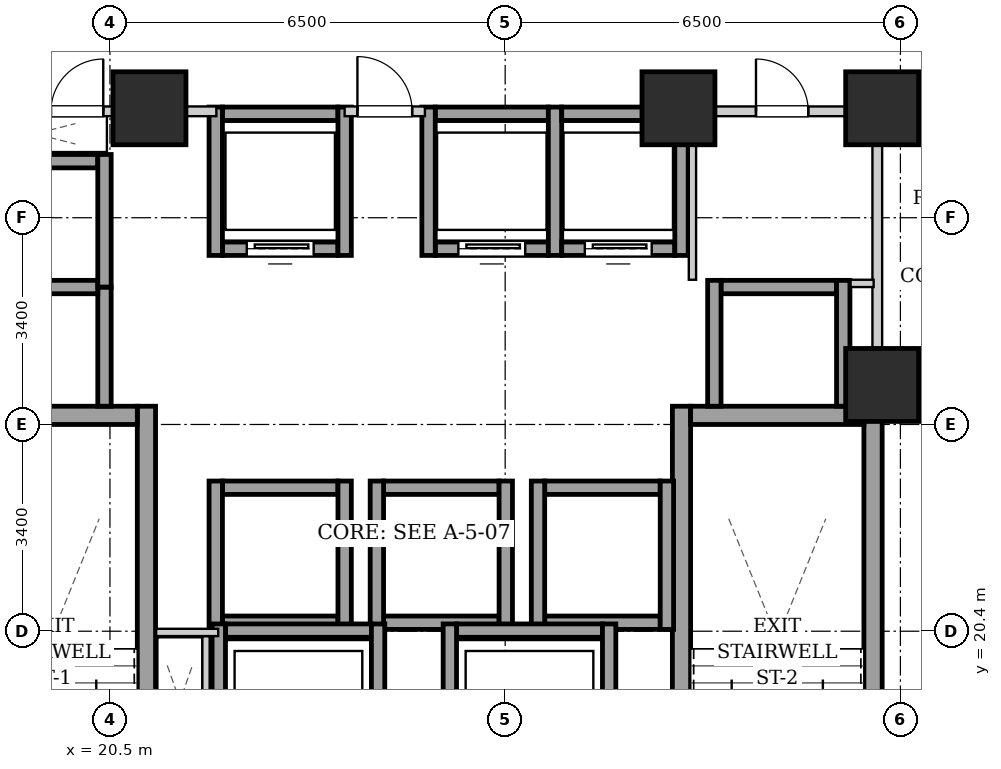
"""IFC4 building model, lengths in metres.
Left out: names, types, materials, properties, quantities, classifications, styles, units other than length and angle.
Written with IfcOpenShell. Run it as: python <this file> out.ifc"""

import sys

from ifc_helpers import new_model, si_unit, direction, frame, frame_2d, origin, origin_2d, place, context, subcontext, project, spatial, rectangle, extrude, element, fill, save


model = new_model("IFC4")
c1 = context("Model", 3, precision=1e-05, world=origin(), true_north=direction((0.0, 1.0)))
c2 = subcontext(c1, "Body", "Model", "MODEL_VIEW")
j1 = project(units=[si_unit("LENGTHUNIT", "METRE"), si_unit("PLANEANGLEUNIT", "RADIAN")], contexts=[c1])
p1 = place(None, origin())
s1 = spatial("IfcSite", under=j1, at=p1, CompositionType="ELEMENT")
p2 = place(p1, origin())
s2 = spatial("IfcBuilding", under=s1, at=p2, CompositionType="ELEMENT")
p3 = place(p2, frame((0.0, 0.0, 70.6)))
s3 = spatial("IfcBuildingStorey", under=s2, at=p3, CompositionType="ELEMENT", Elevation=70.6)
for number, where, z_axis, x_axis in (
    (1, (21.15, 29.0, 0.0), (0.0, 0.0, 1.0), (1.0, 0.0, 0.0)),
    (2, (29.85, 29.0, 0.0), (0.0, 0.0, 1.0), (1.0, 0.0, 0.0)),
    (3, (33.2, 29.0, 0.0), (0.0, 0.0, 1.0), (1.0, 0.0, 0.0)),
    (4, (33.2, 24.45, 0.0), (0.0, 0.0, 1.0), (1.0, 0.0, 0.0)),
):
    element("IfcColumn", number, at=place(p3, frame(where, z_axis=z_axis, x_axis=x_axis)), inside=s3, PredefinedType="COLUMN", context=c2, shape_type="SweptSolid", body=[
        extrude(rectangle(XDim=1.2, YDim=1.2, at=origin_2d()), origin(), (0.0, 0.0, 1.0), 4.5),
    ])
p4 = place(p3, frame((21.1, 15.1, 0.0), z_axis=(0.0, 0.0, 1.0), x_axis=(0.0, 1.0, 0.0)))
e5 = element("IfcWall", 5, at=p4, inside=s3, PredefinedType="SHEAR", context=c2, shape_type="SweptSolid", body=[
    extrude(rectangle(XDim=9.0, YDim=0.3, at=frame_2d((4.5, 0.0))), origin(), (0.0, 0.0, 1.0), 4.24),
])
p5 = place(p3, frame((18.1, 23.95, 0.0), z_axis=(0.0, 0.0, 1.0), x_axis=(1.0, 0.0, 0.0)))
e6 = element("IfcWall", 6, at=p5, inside=s3, PredefinedType="SHEAR", context=c2, shape_type="SweptSolid", body=[
    extrude(rectangle(XDim=2.85, YDim=0.3, at=frame_2d((1.425, 0.0))), origin(), (0.0, 0.0, 1.0), 4.24),
])
for number, where, z_axis, x_axis in (
    (7, (29.9, 15.1, 0.0), (0.0, 0.0, 1.0), (0.0, 1.0, 0.0)),
    (8, (33.05, 15.1, 0.0), (0.0, 0.0, 1.0), (0.0, 1.0, 0.0)),
):
    element("IfcWall", number, at=place(p3, frame(where, z_axis=z_axis, x_axis=x_axis)), inside=s3, PredefinedType="SHEAR", context=c2, shape_type="SweptSolid", body=[
        extrude(rectangle(XDim=9.0, YDim=0.3, at=frame_2d((4.5, 0.0))), origin(), (0.0, 0.0, 1.0), 4.24),
    ])
p6 = place(p3, frame((30.05, 23.95, 0.0), z_axis=(0.0, 0.0, 1.0), x_axis=(1.0, 0.0, 0.0)))
e9 = element("IfcWall", 9, at=p6, inside=s3, PredefinedType="SHEAR", context=c2, shape_type="SweptSolid", body=[
    extrude(rectangle(XDim=2.85, YDim=0.3, at=frame_2d((1.425, 0.0))), origin(), (0.0, 0.0, 1.0), 4.24),
])
p7 = place(p3, frame((22.35, 26.69, 0.0), z_axis=(0.0, 0.0, 1.0), x_axis=(1.0, 0.0, 0.0)))
e10 = element("IfcWall", 10, at=p7, inside=s3, PredefinedType="SHEAR", context=c2, shape_type="SweptSolid", body=[
    extrude(rectangle(XDim=1.9, YDim=0.22, at=frame_2d((0.95, 0.0))), origin(), (0.0, 0.0, 1.0), 4.24),
])
p8 = place(p7, frame((0.4, 0.0, 0.0)))
e11 = element("IfcOpeningElement", 11, at=p8, cuts=e10, PredefinedType="OPENING", context=c2, shape_type="SweptSolid", body=[
    extrude(rectangle(XDim=1.1, YDim=2.15, at=frame_2d((0.55, 1.075))), frame((0.0, 0.12, 0.0), z_axis=(0.0, -1.0, 0.0), x_axis=(1.0, 0.0, 0.0)), (0.0, 0.0, 1.0), 0.24),
])
p9 = place(p3, frame((22.35, 28.91, 0.0), z_axis=(0.0, 0.0, 1.0), x_axis=(1.0, 0.0, 0.0)))
e12 = element("IfcWall", 12, at=p9, inside=s3, PredefinedType="SHEAR", context=c2, shape_type="SweptSolid", body=[
    extrude(rectangle(XDim=1.9, YDim=0.22, at=frame_2d((0.95, 0.0))), origin(), (0.0, 0.0, 1.0), 4.24),
])
for number, where, z_axis, x_axis in (
    (13, (22.24, 26.58, 0.0), (0.0, 0.0, 1.0), (0.0, 1.0, 0.0)),
    (14, (24.36, 26.58, 0.0), (0.0, 0.0, 1.0), (0.0, 1.0, 0.0)),
):
    element("IfcWall", number, at=place(p3, frame(where, z_axis=z_axis, x_axis=x_axis)), inside=s3, PredefinedType="SHEAR", context=c2, shape_type="SweptSolid", body=[
        extrude(rectangle(XDim=2.44, YDim=0.22, at=frame_2d((1.22, 0.0))), origin(), (0.0, 0.0, 1.0), 4.24),
    ])
p10 = place(p3, frame((25.85, 26.69, 0.0), z_axis=(0.0, 0.0, 1.0), x_axis=(1.0, 0.0, 0.0)))
e15 = element("IfcWall", 15, at=p10, inside=s3, PredefinedType="SHEAR", context=c2, shape_type="SweptSolid", body=[
    extrude(rectangle(XDim=1.86, YDim=0.22, at=frame_2d((0.93, 0.0))), origin(), (0.0, 0.0, 1.0), 4.24),
])
p11 = place(p10, frame((0.38, 0.0, 0.0)))
e16 = element("IfcOpeningElement", 16, at=p11, cuts=e15, PredefinedType="OPENING", context=c2, shape_type="SweptSolid", body=[
    extrude(rectangle(XDim=1.1, YDim=2.15, at=frame_2d((0.55, 1.075))), frame((0.0, 0.12, 0.0), z_axis=(0.0, -1.0, 0.0), x_axis=(1.0, 0.0, 0.0)), (0.0, 0.0, 1.0), 0.24),
])
p12 = place(p3, frame((25.85, 28.91, 0.0), z_axis=(0.0, 0.0, 1.0), x_axis=(1.0, 0.0, 0.0)))
e17 = element("IfcWall", 17, at=p12, inside=s3, PredefinedType="SHEAR", context=c2, shape_type="SweptSolid", body=[
    extrude(rectangle(XDim=1.86, YDim=0.22, at=frame_2d((0.93, 0.0))), origin(), (0.0, 0.0, 1.0), 4.24),
])
for number, where, z_axis, x_axis in (
    (18, (25.74, 26.58, 0.0), (0.0, 0.0, 1.0), (0.0, 1.0, 0.0)),
    (19, (27.82, 26.58, 0.0), (0.0, 0.0, 1.0), (0.0, 1.0, 0.0)),
):
    element("IfcWall", number, at=place(p3, frame(where, z_axis=z_axis, x_axis=x_axis)), inside=s3, PredefinedType="SHEAR", context=c2, shape_type="SweptSolid", body=[
        extrude(rectangle(XDim=2.44, YDim=0.22, at=frame_2d((1.22, 0.0))), origin(), (0.0, 0.0, 1.0), 4.24),
    ])
p13 = place(p3, frame((27.93, 26.69, 0.0), z_axis=(0.0, 0.0, 1.0), x_axis=(1.0, 0.0, 0.0)))
e20 = element("IfcWall", 20, at=p13, inside=s3, PredefinedType="SHEAR", context=c2, shape_type="SweptSolid", body=[
    extrude(rectangle(XDim=1.86, YDim=0.22, at=frame_2d((0.93, 0.0))), origin(), (0.0, 0.0, 1.0), 4.24),
])
p14 = place(p13, frame((0.38, 0.0, 0.0)))
e21 = element("IfcOpeningElement", 21, at=p14, cuts=e20, PredefinedType="OPENING", context=c2, shape_type="SweptSolid", body=[
    extrude(rectangle(XDim=1.1, YDim=2.15, at=frame_2d((0.55, 1.075))), frame((0.0, 0.12, 0.0), z_axis=(0.0, -1.0, 0.0), x_axis=(1.0, 0.0, 0.0)), (0.0, 0.0, 1.0), 0.24),
])
p15 = place(p3, frame((27.93, 28.91, 0.0), z_axis=(0.0, 0.0, 1.0), x_axis=(1.0, 0.0, 0.0)))
e22 = element("IfcWall", 22, at=p15, inside=s3, PredefinedType="SHEAR", context=c2, shape_type="SweptSolid", body=[
    extrude(rectangle(XDim=1.86, YDim=0.22, at=frame_2d((0.93, 0.0))), origin(), (0.0, 0.0, 1.0), 4.24),
])
p16 = place(p3, frame((29.9, 26.58, 0.0), z_axis=(0.0, 0.0, 1.0), x_axis=(0.0, 1.0, 0.0)))
e23 = element("IfcWall", 23, at=p16, inside=s3, PredefinedType="SHEAR", context=c2, shape_type="SweptSolid", body=[
    extrude(rectangle(XDim=2.44, YDim=0.22, at=frame_2d((1.22, 0.0))), origin(), (0.0, 0.0, 1.0), 4.24),
])
for number, where, z_axis, x_axis in (
    (24, (22.35, 20.54, 0.0), (0.0, 0.0, 1.0), (1.0, 0.0, 0.0)),
    (25, (22.35, 22.76, 0.0), (0.0, 0.0, 1.0), (1.0, 0.0, 0.0)),
):
    element("IfcWall", number, at=place(p3, frame(where, z_axis=z_axis, x_axis=x_axis)), inside=s3, PredefinedType="SHEAR", context=c2, shape_type="SweptSolid", body=[
        extrude(rectangle(XDim=1.9, YDim=0.22, at=frame_2d((0.95, 0.0))), origin(), (0.0, 0.0, 1.0), 4.24),
    ])
for number, where, z_axis, x_axis in (
    (26, (22.24, 20.43, 0.0), (0.0, 0.0, 1.0), (0.0, 1.0, 0.0)),
    (27, (24.36, 20.43, 0.0), (0.0, 0.0, 1.0), (0.0, 1.0, 0.0)),
):
    element("IfcWall", number, at=place(p3, frame(where, z_axis=z_axis, x_axis=x_axis)), inside=s3, PredefinedType="SHEAR", context=c2, shape_type="SweptSolid", body=[
        extrude(rectangle(XDim=2.44, YDim=0.22, at=frame_2d((1.22, 0.0))), origin(), (0.0, 0.0, 1.0), 4.24),
    ])
for number, where, z_axis, x_axis in (
    (28, (25.0, 20.54, 0.0), (0.0, 0.0, 1.0), (1.0, 0.0, 0.0)),
    (29, (25.0, 22.76, 0.0), (0.0, 0.0, 1.0), (1.0, 0.0, 0.0)),
):
    element("IfcWall", number, at=place(p3, frame(where, z_axis=z_axis, x_axis=x_axis)), inside=s3, PredefinedType="SHEAR", context=c2, shape_type="SweptSolid", body=[
        extrude(rectangle(XDim=1.9, YDim=0.22, at=frame_2d((0.95, 0.0))), origin(), (0.0, 0.0, 1.0), 4.24),
    ])
for number, where, z_axis, x_axis in (
    (30, (24.89, 20.43, 0.0), (0.0, 0.0, 1.0), (0.0, 1.0, 0.0)),
    (31, (27.01, 20.43, 0.0), (0.0, 0.0, 1.0), (0.0, 1.0, 0.0)),
):
    element("IfcWall", number, at=place(p3, frame(where, z_axis=z_axis, x_axis=x_axis)), inside=s3, PredefinedType="SHEAR", context=c2, shape_type="SweptSolid", body=[
        extrude(rectangle(XDim=2.44, YDim=0.22, at=frame_2d((1.22, 0.0))), origin(), (0.0, 0.0, 1.0), 4.24),
    ])
for number, where, z_axis, x_axis in (
    (32, (27.65, 20.54, 0.0), (0.0, 0.0, 1.0), (1.0, 0.0, 0.0)),
    (33, (27.65, 22.76, 0.0), (0.0, 0.0, 1.0), (1.0, 0.0, 0.0)),
):
    element("IfcWall", number, at=place(p3, frame(where, z_axis=z_axis, x_axis=x_axis)), inside=s3, PredefinedType="SHEAR", context=c2, shape_type="SweptSolid", body=[
        extrude(rectangle(XDim=1.9, YDim=0.22, at=frame_2d((0.95, 0.0))), origin(), (0.0, 0.0, 1.0), 4.24),
    ])
for number, where, z_axis, x_axis in (
    (34, (27.54, 20.43, 0.0), (0.0, 0.0, 1.0), (0.0, 1.0, 0.0)),
    (35, (29.66, 20.43, 0.0), (0.0, 0.0, 1.0), (0.0, 1.0, 0.0)),
):
    element("IfcWall", number, at=place(p3, frame(where, z_axis=z_axis, x_axis=x_axis)), inside=s3, PredefinedType="SHEAR", context=c2, shape_type="SweptSolid", body=[
        extrude(rectangle(XDim=2.44, YDim=0.22, at=frame_2d((1.22, 0.0))), origin(), (0.0, 0.0, 1.0), 4.24),
    ])
p17 = place(p3, frame((20.41, 24.1, 0.0), z_axis=(0.0, 0.0, 1.0), x_axis=(0.0, 1.0, 0.0)))
e36 = element("IfcWall", 36, at=p17, inside=s3, PredefinedType="SHEAR", context=c2, shape_type="SweptSolid", body=[
    extrude(rectangle(XDim=1.96, YDim=0.22, at=frame_2d((0.98, 0.0))), origin(), (0.0, 0.0, 1.0), 4.24),
])
for number, where, z_axis, x_axis in (
    (37, (18.4, 26.06, 0.0), (0.0, 0.0, 1.0), (1.0, 0.0, 0.0)),
    (38, (18.4, 28.13, 0.0), (0.0, 0.0, 1.0), (1.0, 0.0, 0.0)),
):
    element("IfcWall", number, at=place(p3, frame(where, z_axis=z_axis, x_axis=x_axis)), inside=s3, PredefinedType="SHEAR", context=c2, shape_type="SweptSolid", body=[
        extrude(rectangle(XDim=1.9, YDim=0.22, at=frame_2d((0.95, 0.0))), origin(), (0.0, 0.0, 1.0), 4.24),
    ])
p18 = place(p3, frame((20.41, 26.06, 0.0), z_axis=(0.0, 0.0, 1.0), x_axis=(0.0, 1.0, 0.0)))
e39 = element("IfcWall", 39, at=p18, inside=s3, PredefinedType="SHEAR", context=c2, shape_type="SweptSolid", body=[
    extrude(rectangle(XDim=2.18, YDim=0.22, at=frame_2d((1.09, 0.0))), origin(), (0.0, 0.0, 1.0), 4.24),
])
p19 = place(p3, frame((30.55, 26.06, 0.0), z_axis=(0.0, 0.0, 1.0), x_axis=(1.0, 0.0, 0.0)))
e40 = element("IfcWall", 40, at=p19, inside=s3, PredefinedType="SHEAR", context=c2, shape_type="SweptSolid", body=[
    extrude(rectangle(XDim=1.9, YDim=0.22, at=frame_2d((0.95, 0.0))), origin(), (0.0, 0.0, 1.0), 4.24),
])
for number, where, z_axis, x_axis in (
    (41, (30.44, 24.1, 0.0), (0.0, 0.0, 1.0), (0.0, 1.0, 0.0)),
    (42, (32.56, 24.1, 0.0), (0.0, 0.0, 1.0), (0.0, 1.0, 0.0)),
):
    element("IfcWall", number, at=place(p3, frame(where, z_axis=z_axis, x_axis=x_axis)), inside=s3, PredefinedType="SHEAR", context=c2, shape_type="SweptSolid", body=[
        extrude(rectangle(XDim=2.07, YDim=0.22, at=frame_2d((1.035, 0.0))), origin(), (0.0, 0.0, 1.0), 4.24),
    ])
p20 = place(p3, frame((22.4, 20.41, 0.0), z_axis=(0.0, 0.0, 1.0), x_axis=(1.0, 0.0, 0.0)))
e43 = element("IfcWall", 43, at=p20, inside=s3, PredefinedType="SHEAR", context=c2, shape_type="SweptSolid", body=[
    extrude(rectangle(XDim=2.4, YDim=0.22, at=frame_2d((1.2, 0.0))), origin(), (0.0, 0.0, 1.0), 4.24),
])
for number, where, z_axis, x_axis in (
    (44, (22.29, 17.98, 0.0), (0.0, 0.0, 1.0), (0.0, 1.0, 0.0)),
    (45, (24.91, 17.98, 0.0), (0.0, 0.0, 1.0), (0.0, 1.0, 0.0)),
):
    element("IfcWall", number, at=place(p3, frame(where, z_axis=z_axis, x_axis=x_axis)), inside=s3, PredefinedType="SHEAR", context=c2, shape_type="SweptSolid", body=[
        extrude(rectangle(XDim=2.54, YDim=0.22, at=frame_2d((1.27, 0.0))), origin(), (0.0, 0.0, 1.0), 4.24),
    ])
p21 = place(p3, frame((26.2, 20.41, 0.0), z_axis=(0.0, 0.0, 1.0), x_axis=(1.0, 0.0, 0.0)))
e46 = element("IfcWall", 46, at=p21, inside=s3, PredefinedType="SHEAR", context=c2, shape_type="SweptSolid", body=[
    extrude(rectangle(XDim=2.4, YDim=0.22, at=frame_2d((1.2, 0.0))), origin(), (0.0, 0.0, 1.0), 4.24),
])
for number, where, z_axis, x_axis in (
    (47, (26.09, 17.98, 0.0), (0.0, 0.0, 1.0), (0.0, 1.0, 0.0)),
    (48, (28.71, 17.98, 0.0), (0.0, 0.0, 1.0), (0.0, 1.0, 0.0)),
):
    element("IfcWall", number, at=place(p3, frame(where, z_axis=z_axis, x_axis=x_axis)), inside=s3, PredefinedType="SHEAR", context=c2, shape_type="SweptSolid", body=[
        extrude(rectangle(XDim=2.54, YDim=0.22, at=frame_2d((1.27, 0.0))), origin(), (0.0, 0.0, 1.0), 4.24),
    ])
p22 = place(p3, frame((33.12, 24.12, 0.0), z_axis=(0.0, 0.0, 1.0), x_axis=(0.0, 1.0, 0.0)))
e49 = element("IfcWall", 49, at=p22, inside=s3, PredefinedType="PARTITIONING", context=c2, shape_type="SweptSolid", body=[
    extrude(rectangle(XDim=4.76, YDim=0.16, at=frame_2d((2.38, 0.0))), origin(), (0.0, 0.0, 1.0), 4.24),
])
p23 = place(p3, frame((24.36, 28.95, 0.0), z_axis=(0.0, 0.0, 1.0), x_axis=(1.0, 0.0, 0.0)))
e50 = element("IfcWall", 50, at=p23, inside=s3, PredefinedType="PARTITIONING", context=c2, shape_type="SweptSolid", body=[
    extrude(rectangle(XDim=1.32, YDim=0.16, at=frame_2d((0.66, 0.0))), origin(), (0.0, 0.0, 1.0), 4.24),
])
p24 = place(p23, frame((0.21, 0.0, 0.0)))
e51 = element("IfcOpeningElement", 51, at=p24, cuts=e50, PredefinedType="OPENING", context=c2, shape_type="SweptSolid", body=[
    extrude(rectangle(XDim=0.9, YDim=2.05, at=frame_2d((0.45, 1.025))), frame((0.0, 0.09, 0.0), z_axis=(0.0, -1.0, 0.0), x_axis=(1.0, 0.0, 0.0)), (0.0, 0.0, 1.0), 0.18),
])
p25 = place(p3, frame((17.96, 28.95, 0.0), z_axis=(0.0, 0.0, 1.0), x_axis=(1.0, 0.0, 0.0)))
e52 = element("IfcWall", 52, at=p25, inside=s3, PredefinedType="PARTITIONING", context=c2, shape_type="SweptSolid", body=[
    extrude(rectangle(XDim=4.29, YDim=0.16, at=frame_2d((2.145, 0.0))), origin(), (0.0, 0.0, 1.0), 4.24),
])
p26 = place(p25, frame((1.57, 0.0, 0.0)))
e53 = element("IfcOpeningElement", 53, at=p26, cuts=e52, PredefinedType="OPENING", context=c2, shape_type="SweptSolid", body=[
    extrude(rectangle(XDim=0.86, YDim=2.05, at=frame_2d((0.43, 1.025))), frame((0.0, 0.09, 0.0), z_axis=(0.0, -1.0, 0.0), x_axis=(1.0, 0.0, 0.0)), (0.0, 0.0, 1.0), 0.18),
])
p27 = place(p3, frame((22.08, 18.2, 0.0), z_axis=(0.0, 0.0, 1.0), x_axis=(0.0, 1.0, 0.0)))
e54 = element("IfcWall", 54, at=p27, inside=s3, PredefinedType="PARTITIONING", context=c2, shape_type="SweptSolid", body=[
    extrude(rectangle(XDim=2.12, YDim=0.12, at=frame_2d((1.06, 0.0))), origin(), (0.0, 0.0, 1.0), 4.24),
])
p28 = place(p3, frame((22.28, 20.38, 0.0), z_axis=(0.0, 0.0, 1.0), x_axis=(-1.0, 0.0, 0.0)))
e55 = element("IfcWall", 55, at=p28, inside=s3, PredefinedType="PARTITIONING", context=c2, shape_type="SweptSolid", body=[
    extrude(rectangle(XDim=1.02, YDim=0.12, at=frame_2d((0.51, 0.0))), origin(), (0.0, 0.0, 1.0), 4.24),
])
p29 = place(p3, frame((30.08, 26.18, 0.0), z_axis=(0.0, 0.0, 1.0), x_axis=(0.0, 1.0, 0.0)))
e56 = element("IfcWall", 56, at=p29, inside=s3, PredefinedType="PARTITIONING", context=c2, shape_type="SweptSolid", body=[
    extrude(rectangle(XDim=2.68, YDim=0.12, at=frame_2d((1.34, 0.0))), origin(), (0.0, 0.0, 1.0), 4.24),
])
p30 = place(p3, frame((32.68, 26.12, 0.0), z_axis=(0.0, 0.0, 1.0), x_axis=(1.0, 0.0, 0.0)))
e57 = element("IfcWall", 57, at=p30, inside=s3, PredefinedType="PARTITIONING", context=c2, shape_type="SweptSolid", body=[
    extrude(rectangle(XDim=0.38, YDim=0.12, at=frame_2d((0.19, 0.0))), origin(), (0.0, 0.0, 1.0), 4.24),
])
p31 = place(p3, frame((30.08, 28.95, 0.0), z_axis=(0.0, 0.0, 1.0), x_axis=(1.0, 0.0, 0.0)))
e58 = element("IfcWall", 58, at=p31, inside=s3, PredefinedType="PARTITIONING", context=c2, shape_type="SweptSolid", body=[
    extrude(rectangle(XDim=2.96, YDim=0.16, at=frame_2d((1.48, 0.0))), origin(), (0.0, 0.0, 1.0), 4.24),
])
p32 = place(p31, frame((1.045, 0.0, 0.0)))
e59 = element("IfcOpeningElement", 59, at=p32, cuts=e58, PredefinedType="OPENING", context=c2, shape_type="SweptSolid", body=[
    extrude(rectangle(XDim=0.86, YDim=2.05, at=frame_2d((0.43, 1.025))), frame((0.0, 0.09, 0.0), z_axis=(0.0, -1.0, 0.0), x_axis=(1.0, 0.0, 0.0)), (0.0, 0.0, 1.0), 0.18),
])
p33 = place(p8, origin())
e60 = element("IfcDoor", 60, at=p33, inside=s3, OperationType="SLIDING_TO_LEFT", PredefinedType="DOOR", context=c2, shape_type="SweptSolid", body=[
    extrude(rectangle(XDim=1.1, YDim=2.15, at=frame_2d((0.55, 1.075))), frame((0.0, 0.025, 0.0), z_axis=(0.0, -1.0, 0.0), x_axis=(1.0, 0.0, 0.0)), (0.0, 0.0, 1.0), 0.05),
])
fill(e11, e60)
p34 = place(p11, origin())
e61 = element("IfcDoor", 61, at=p34, inside=s3, OperationType="SLIDING_TO_LEFT", PredefinedType="DOOR", context=c2, shape_type="SweptSolid", body=[
    extrude(rectangle(XDim=1.1, YDim=2.15, at=frame_2d((0.55, 1.075))), frame((0.0, 0.025, 0.0), z_axis=(0.0, -1.0, 0.0), x_axis=(1.0, 0.0, 0.0)), (0.0, 0.0, 1.0), 0.05),
])
fill(e16, e61)
p35 = place(p14, origin())
e62 = element("IfcDoor", 62, at=p35, inside=s3, OperationType="SLIDING_TO_LEFT", PredefinedType="DOOR", context=c2, shape_type="SweptSolid", body=[
    extrude(rectangle(XDim=1.1, YDim=2.15, at=frame_2d((0.55, 1.075))), frame((0.0, 0.025, 0.0), z_axis=(0.0, -1.0, 0.0), x_axis=(1.0, 0.0, 0.0)), (0.0, 0.0, 1.0), 0.05),
])
fill(e21, e62)
p36 = place(p24, origin())
e63 = element("IfcDoor", 63, at=p36, inside=s3, OperationType="SINGLE_SWING_LEFT", PredefinedType="DOOR", context=c2, shape_type="SweptSolid", body=[
    extrude(rectangle(XDim=0.9, YDim=2.05, at=frame_2d((0.45, 1.025))), frame((0.0, 0.025, 0.0), z_axis=(0.0, -1.0, 0.0), x_axis=(1.0, 0.0, 0.0)), (0.0, 0.0, 1.0), 0.05),
])
fill(e51, e63)
p37 = place(p26, origin())
e64 = element("IfcDoor", 64, at=p37, inside=s3, OperationType="SINGLE_SWING_RIGHT", PredefinedType="DOOR", context=c2, shape_type="SweptSolid", body=[
    extrude(rectangle(XDim=0.86, YDim=2.05, at=frame_2d((0.43, 1.025))), frame((0.0, 0.025, 0.0), z_axis=(0.0, -1.0, 0.0), x_axis=(1.0, 0.0, 0.0)), (0.0, 0.0, 1.0), 0.05),
])
fill(e53, e64)
p38 = place(p32, origin())
e65 = element("IfcDoor", 65, at=p38, inside=s3, OperationType="SINGLE_SWING_LEFT", PredefinedType="DOOR", context=c2, shape_type="SweptSolid", body=[
    extrude(rectangle(XDim=0.86, YDim=2.05, at=frame_2d((0.43, 1.025))), frame((0.0, 0.025, 0.0), z_axis=(0.0, -1.0, 0.0), x_axis=(1.0, 0.0, 0.0)), (0.0, 0.0, 1.0), 0.05),
])
fill(e59, e65)
save(model, sys.argv[1])
